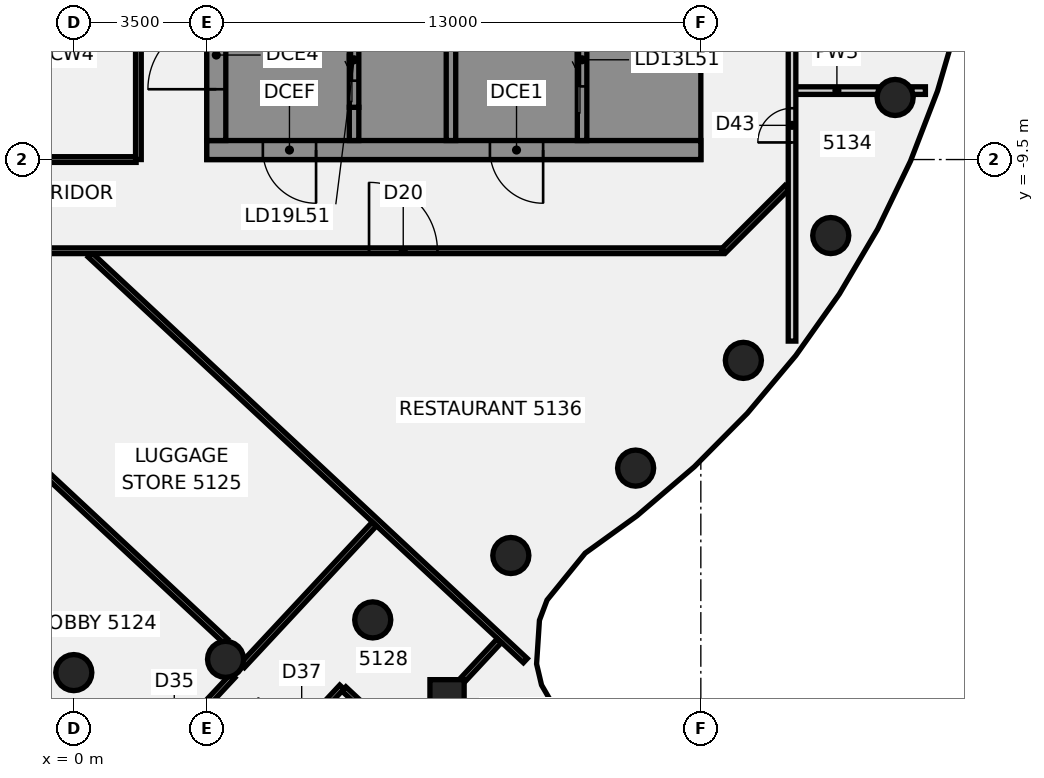
"""IFC4 building model, lengths in metres.
Left out: names, types, materials, properties, quantities, classifications, styles, units other than length and angle.
Written with IfcOpenShell. Run it as: python <this file> out.ifc"""

import sys

from ifc_helpers import new_model, si_unit, direction, frame, frame_2d, origin, origin_2d, place, context, subcontext, project, spatial, polyline, rectangle, circle, outline, extrude, element, fill, save


model = new_model("IFC4")
c1 = context("Model", 3, precision=1e-05, world=origin(), true_north=direction((0.0, 1.0)))
c2 = subcontext(c1, "Body", "Model", "MODEL_VIEW")
j1 = project(units=[si_unit("LENGTHUNIT", "METRE"), si_unit("PLANEANGLEUNIT", "RADIAN")], contexts=[c1])
p1 = place(None, origin())
s1 = spatial("IfcSite", under=j1, at=p1, CompositionType="ELEMENT")
p2 = place(p1, origin())
s2 = spatial("IfcBuilding", under=s1, at=p2, CompositionType="ELEMENT")
p3 = place(p2, frame((0.0, 0.0, 204.1)))
s3 = spatial("IfcBuildingStorey", under=s2, at=p3, CompositionType="ELEMENT", Elevation=204.1)
for number, where, z_axis, x_axis in (
    (1, (0.0, -23.0, -0.14), (0.0, 0.0, 1.0), (1.0, 0.0, 0.0)),
    (2, (3.994, -22.651, -0.14), (0.0, 0.0, 1.0), (1.0, 0.0, 0.0)),
    (3, (7.866, -21.613, -0.14), (0.0, 0.0, 1.0), (1.0, 0.0, 0.0)),
    (4, (11.5, -19.919, -0.14), (0.0, 0.0, 1.0), (1.0, 0.0, 0.0)),
    (5, (14.784, -17.619, -0.14), (0.0, 0.0, 1.0), (1.0, 0.0, 0.0)),
    (6, (17.619, -14.784, -0.14), (0.0, 0.0, 1.0), (1.0, 0.0, 0.0)),
    (7, (19.919, -11.5, -0.14), (0.0, 0.0, 1.0), (1.0, 0.0, 0.0)),
    (8, (21.613, -7.866, -0.14), (0.0, 0.0, 1.0), (1.0, 0.0, 0.0)),
):
    element("IfcColumn", number, at=place(p3, frame(where, z_axis=z_axis, x_axis=x_axis)), inside=s3, PredefinedType="COLUMN", context=c2, shape_type="SweptSolid", body=[
        extrude(circle(Radius=0.475, at=origin_2d()), origin(), (0.0, 0.0, 1.0), 3.6),
    ])
p4 = place(p3, frame((9.822, -23.635, -0.139), z_axis=(0.00779464519, 0.049750170171, 0.998731277208), x_axis=(-0.681290927814, -0.730822792245, 0.041721912875)))
e9 = element("IfcColumn", 9, at=p4, inside=s3, PredefinedType="COLUMN", context=c2, shape_type="SweptSolid", body=[
    extrude(rectangle(XDim=0.9, YDim=0.9, at=origin_2d()), origin(), (0.0, 0.0, 1.0), 3.602),
])
p5 = place(p3, frame((-11.956, -14.412, 0.0), z_axis=(0.0, 0.0, 1.0), x_axis=(0.731533748832, -0.681805231954, 0.0)))
e10 = element("IfcWall", 10, at=p5, inside=s3, PredefinedType="PARTITIONING", context=c2, shape_type="SweptSolid", body=[
    extrude(rectangle(XDim=17.64, YDim=0.15, at=frame_2d((8.82, 0.0))), origin(), (0.0, 0.0, 1.0), 2.864),
])
p6 = place(p5, frame((8.92, 0.0, 0.0)))
e11 = element("IfcOpeningElement", 11, at=p6, cuts=e10, PredefinedType="OPENING", context=c2, shape_type="SweptSolid", body=[
    extrude(rectangle(XDim=1.8, YDim=2.1, at=frame_2d((0.9, 1.05))), frame((0.0, 0.085, 0.0), z_axis=(0.0, -1.0, 0.0), x_axis=(1.0, 0.0, 0.0)), (0.0, 0.0, 1.0), 0.17),
])
p7 = place(p3, frame((-6.903, -12.012, 0.0), z_axis=(0.0, 0.0, 1.0), x_axis=(0.731569122532, -0.681767276245, 0.0)))
e12 = element("IfcWall", 12, at=p7, inside=s3, PredefinedType="PARTITIONING", context=c2, shape_type="SweptSolid", body=[
    extrude(rectangle(XDim=14.893, YDim=0.15, at=frame_2d((7.447, 0.0))), origin(), (0.0, 0.0, 1.0), 2.864),
])
p8 = place(p7, frame((4.785, 0.0, 0.0)))
e13 = element("IfcOpeningElement", 13, at=p8, cuts=e12, PredefinedType="OPENING", context=c2, shape_type="SweptSolid", body=[
    extrude(rectangle(XDim=0.9, YDim=2.1, at=frame_2d((0.45, 1.05))), frame((0.0, 0.085, 0.0), z_axis=(0.0, -1.0, 0.0), x_axis=(1.0, 0.0, 0.0)), (0.0, 0.0, 1.0), 0.17),
])
p9 = place(p3, frame((0.431, -12.012, 0.0), z_axis=(0.0, 0.0, 1.0), x_axis=(0.731576312629, -0.681759560843, 0.0)))
e14 = element("IfcWall", 14, at=p9, inside=s3, PredefinedType="PARTITIONING", context=c2, shape_type="SweptSolid", body=[
    extrude(rectangle(XDim=15.653, YDim=0.15, at=frame_2d((7.827, 0.0))), origin(), (0.0, 0.0, 1.0), 2.864),
])
p10 = place(p3, frame((7.108, -23.43, 0.0), z_axis=(0.0, 0.0, 1.0), x_axis=(0.731647999117, -0.681682628052, 0.0)))
e15 = element("IfcWall", 15, at=p10, inside=s3, PredefinedType="PARTITIONING", context=c2, shape_type="SweptSolid", body=[
    extrude(rectangle(XDim=4.285, YDim=0.15, at=frame_2d((2.143, 0.0))), origin(), (0.0, 0.0, 1.0), 2.864),
])
p11 = place(p3, frame((-17.1, -11.9, 0.0), z_axis=(0.0, 0.0, 1.0), x_axis=(1.0, 0.0, 0.0)))
e16 = element("IfcWall", 16, at=p11, inside=s3, PredefinedType="PARTITIONING", context=c2, shape_type="SweptSolid", body=[
    extrude(rectangle(XDim=34.165, YDim=0.15, at=frame_2d((17.083, 0.0))), origin(), (0.0, 0.0, 1.0), 2.864),
])
p12 = place(p11, frame((7.826, 0.0, 0.0)))
e17 = element("IfcOpeningElement", 17, at=p12, cuts=e16, PredefinedType="OPENING", context=c2, shape_type="SweptSolid", body=[
    extrude(rectangle(XDim=1.8, YDim=2.1, at=frame_2d((0.9, 1.05))), frame((0.0, 0.085, 0.0), z_axis=(0.0, -1.0, 0.0), x_axis=(1.0, 0.0, 0.0)), (0.0, 0.0, 1.0), 0.17),
])
p13 = place(p11, frame((2.1, 0.0, 0.0)))
e18 = element("IfcOpeningElement", 18, at=p13, cuts=e16, PredefinedType="OPENING", context=c2, shape_type="SweptSolid", body=[
    extrude(rectangle(XDim=1.8, YDim=2.1, at=frame_2d((0.9, 1.05))), frame((0.0, 0.085, 0.0), z_axis=(0.0, -1.0, 0.0), x_axis=(1.0, 0.0, 0.0)), (0.0, 0.0, 1.0), 0.17),
])
p14 = place(p11, frame((24.869, 0.0, 0.0)))
e19 = element("IfcOpeningElement", 19, at=p14, cuts=e16, PredefinedType="OPENING", context=c2, shape_type="SweptSolid", body=[
    extrude(rectangle(XDim=1.8, YDim=2.1, at=frame_2d((0.9, 1.05))), frame((0.0, 0.085, 0.0), z_axis=(0.0, -1.0, 0.0), x_axis=(1.0, 0.0, 0.0)), (0.0, 0.0, 1.0), 0.17),
])
p15 = place(p3, frame((-1.64, -9.5, 0.0), z_axis=(0.0, 0.0, 1.0), x_axis=(1.0, 0.0, 0.0)))
e20 = element("IfcWall", 20, at=p15, inside=s3, PredefinedType="PARTITIONING", context=c2, shape_type="SweptSolid", body=[
    extrude(rectangle(XDim=3.28, YDim=0.15, at=frame_2d((1.64, 0.0))), origin(), (0.0, 0.0, 1.0), 2.864),
])
p16 = place(p3, frame((18.985, -7.686, 0.0), z_axis=(0.0, 0.0, 1.0), x_axis=(1.0, 0.0, 0.0)))
e21 = element("IfcWall", 21, at=p16, inside=s3, PredefinedType="PARTITIONING", context=c2, shape_type="SweptSolid", body=[
    extrude(rectangle(XDim=2.191, YDim=0.2, at=frame_2d((1.096, 0.0))), origin(), (0.0, 0.0, 1.0), 2.864),
])
p17 = place(p3, frame((22.05, -7.686, 0.0), z_axis=(0.0, 0.0, 1.0), x_axis=(1.0, 0.0, 0.0)))
e22 = element("IfcWall", 22, at=p17, inside=s3, PredefinedType="PARTITIONING", context=c2, shape_type="SweptSolid", body=[
    extrude(rectangle(XDim=0.36, YDim=0.2, at=frame_2d((0.18, 0.0))), origin(), (0.0, 0.0, 1.0), 2.864),
])
p18 = place(p3, frame((17.1, -11.9, 0.0), z_axis=(0.0, 0.0, 1.0), x_axis=(0.707106781187, 0.707106781187, 0.0)))
e23 = element("IfcWall", 23, at=p18, inside=s3, PredefinedType="PARTITIONING", context=c2, shape_type="SweptSolid", body=[
    extrude(rectangle(XDim=2.355, YDim=0.15, at=frame_2d((1.178, 0.0))), origin(), (0.0, 0.0, 1.0), 2.864),
])
p19 = place(p3, frame((-1.788, -29.491, 0.0), z_axis=(0.0, 0.0, 1.0), x_axis=(0.681864267576, 0.731478721907, 0.0)))
e24 = element("IfcWall", 24, at=p19, inside=s3, PredefinedType="PARTITIONING", context=c2, shape_type="SweptSolid", body=[
    extrude(rectangle(XDim=8.759, YDim=0.15, at=frame_2d((4.379, 0.0))), origin(), (0.0, 0.0, 1.0), 2.864),
])
p20 = place(p19, frame((5.799, 0.0, 0.0)))
e25 = element("IfcOpeningElement", 25, at=p20, cuts=e24, PredefinedType="OPENING", context=c2, shape_type="SweptSolid", body=[
    extrude(rectangle(XDim=1.4, YDim=2.1, at=frame_2d((0.7, 1.05))), frame((0.0, 0.085, 0.0), z_axis=(0.0, -1.0, 0.0), x_axis=(1.0, 0.0, 0.0)), (0.0, 0.0, 1.0), 0.17),
])
p21 = place(p3, frame((4.434, -22.817, 0.0), z_axis=(0.0, 0.0, 1.0), x_axis=(0.681872489445, 0.731471057621, 0.0)))
e26 = element("IfcWall", 26, at=p21, inside=s3, PredefinedType="PARTITIONING", context=c2, shape_type="SweptSolid", body=[
    extrude(rectangle(XDim=5.095, YDim=0.15, at=frame_2d((2.547, 0.0))), origin(), (0.0, 0.0, 1.0), 2.864),
])
p22 = place(p3, frame((5.335, -25.222, 0.0), z_axis=(0.0, 0.0, 1.0), x_axis=(0.68166548211, 0.731663973761, 0.0)))
e27 = element("IfcWall", 27, at=p22, inside=s3, PredefinedType="PARTITIONING", context=c2, shape_type="SweptSolid", body=[
    extrude(rectangle(XDim=2.52, YDim=0.15, at=frame_2d((1.26, 0.0))), origin(), (0.0, 0.0, 1.0), 2.864),
])
p23 = place(p22, frame((0.52, 0.0, 0.0)))
e28 = element("IfcOpeningElement", 28, at=p23, cuts=e27, PredefinedType="OPENING", context=c2, shape_type="SweptSolid", body=[
    extrude(rectangle(XDim=0.9, YDim=2.1, at=frame_2d((0.45, 1.05))), frame((0.0, 0.085, 0.0), z_axis=(0.0, -1.0, 0.0), x_axis=(1.0, 0.0, 0.0)), (0.0, 0.0, 1.0), 0.17),
])
p24 = place(p3, frame((10.235, -23.193, 0.0), z_axis=(0.0, 0.0, 1.0), x_axis=(0.681820060396, 0.731519928124, 0.0)))
e29 = element("IfcWall", 29, at=p24, inside=s3, PredefinedType="PARTITIONING", context=c2, shape_type="SweptSolid", body=[
    extrude(rectangle(XDim=1.415, YDim=0.15, at=frame_2d((0.708, 0.0))), origin(), (0.0, 0.0, 1.0), 2.864),
])
p25 = place(p3, frame((1.7, -9.5, 0.0), z_axis=(0.0, 0.0, 1.0), x_axis=(0.0, 1.0, 0.0)))
e30 = element("IfcWall", 30, at=p25, inside=s3, PredefinedType="PARTITIONING", context=c2, shape_type="SweptSolid", body=[
    extrude(rectangle(XDim=19.0, YDim=0.15, at=frame_2d((9.5, 0.0))), origin(), (0.0, 0.0, 1.0), 2.864),
])
p26 = place(p3, frame((18.9, -14.277, 0.0), z_axis=(0.0, 0.0, 1.0), x_axis=(0.0, 1.0, 0.0)))
e31 = element("IfcWall", 31, at=p26, inside=s3, PredefinedType="PARTITIONING", context=c2, shape_type="SweptSolid", body=[
    extrude(rectangle(XDim=25.605, YDim=0.2, at=frame_2d((12.802, 0.0))), origin(), (0.0, 0.0, 1.0), 2.864),
])
p27 = place(p26, frame((5.227, 0.0, 0.0)))
e32 = element("IfcOpeningElement", 32, at=p27, cuts=e31, PredefinedType="OPENING", context=c2, shape_type="SweptSolid", body=[
    extrude(rectangle(XDim=0.9, YDim=2.1, at=frame_2d((0.45, 1.05))), frame((0.0, 0.11, 0.0), z_axis=(0.0, -1.0, 0.0), x_axis=(1.0, 0.0, 0.0)), (0.0, 0.0, 1.0), 0.22),
])
p28 = place(p26, frame((22.905, 0.0, 0.0)))
e33 = element("IfcOpeningElement", 33, at=p28, cuts=e31, PredefinedType="OPENING", context=c2, shape_type="SweptSolid", body=[
    extrude(rectangle(XDim=0.9, YDim=2.1, at=frame_2d((0.45, 1.05))), frame((0.0, 0.11, 0.0), z_axis=(0.0, -1.0, 0.0), x_axis=(1.0, 0.0, 0.0)), (0.0, 0.0, 1.0), 0.22),
])
p29 = place(p3, frame((16.5, -9.25, 0.0), z_axis=(0.0, 0.0, 1.0), x_axis=(-1.0, 0.0, 0.0)))
e34 = element("IfcWall", 34, at=p29, inside=s3, PredefinedType="SHEAR", context=c2, shape_type="SweptSolid", body=[
    extrude(rectangle(XDim=13.0, YDim=0.5, at=frame_2d((6.5, 0.0))), origin(), (0.0, 0.0, 1.0), 3.46),
])
p30 = place(p29, frame((4.15, 0.0, 0.0)))
e35 = element("IfcOpeningElement", 35, at=p30, cuts=e34, PredefinedType="OPENING", context=c2, shape_type="SweptSolid", body=[
    extrude(rectangle(XDim=1.4, YDim=2.1, at=frame_2d((0.7, 1.05))), frame((0.0, 0.26, 0.0), z_axis=(0.0, -1.0, 0.0), x_axis=(1.0, 0.0, 0.0)), (0.0, 0.0, 1.0), 0.52),
])
p31 = place(p29, frame((10.125, 0.0, 0.0)))
e36 = element("IfcOpeningElement", 36, at=p31, cuts=e34, PredefinedType="OPENING", context=c2, shape_type="SweptSolid", body=[
    extrude(rectangle(XDim=1.4, YDim=2.1, at=frame_2d((0.7, 1.05))), frame((0.0, 0.26, 0.0), z_axis=(0.0, -1.0, 0.0), x_axis=(1.0, 0.0, 0.0)), (0.0, 0.0, 1.0), 0.52),
])
p32 = place(p3, origin())
e37 = element("IfcWall", 37, at=p32, inside=s3, PredefinedType="SHEAR", context=c2, shape_type="SweptSolid", body=[
    extrude(outline(polyline([(13.5, -8.125), (13.5, -9.0), (16.0, -9.0), (16.5, -9.0), (16.5, 9.0), (16.0, 9.0), (13.5, 9.0), (13.5, 8.125), (16.0, 8.125), (16.0, 5.625), (13.5, 5.625), (13.5, 5.375), (16.0, 5.375), (16.0, -5.375), (13.5, -5.375), (13.5, -5.625), (16.0, -5.625), (16.0, -8.125), (13.5, -8.125)])), origin(), (0.0, 0.0, 1.0), 3.46),
])
p33 = place(p3, origin())
e38 = element("IfcWall", 38, at=p33, inside=s3, PredefinedType="SHEAR", context=c2, shape_type="SweptSolid", body=[
    extrude(outline(polyline([(7.5, -8.125), (7.5, -9.0), (9.8, -9.0), (9.8, -8.125), (9.8, -5.625), (9.55, -5.625), (9.55, -8.125), (7.5, -8.125)])), origin(), (0.0, 0.0, 1.0), 3.46),
])
p34 = place(p3, frame((7.375, -9.0, 0.0), z_axis=(0.0, 0.0, 1.0), x_axis=(0.0, 1.0, 0.0)))
e39 = element("IfcWall", 39, at=p34, inside=s3, PredefinedType="SHEAR", context=c2, shape_type="SweptSolid", body=[
    extrude(rectangle(XDim=0.875, YDim=0.25, at=frame_2d((0.438, 0.0))), origin(), (0.0, 0.0, 1.0), 3.46),
])
p35 = place(p3, frame((13.375, -9.0, 0.0), z_axis=(0.0, 0.0, 1.0), x_axis=(0.0, 1.0, 0.0)))
e40 = element("IfcWall", 40, at=p35, inside=s3, PredefinedType="SHEAR", context=c2, shape_type="SweptSolid", body=[
    extrude(rectangle(XDim=18.0, YDim=0.25, at=frame_2d((9.0, 0.0))), origin(), (0.0, 0.0, 1.0), 3.46),
])
p36 = place(p35, frame((1.425, 0.0, 0.0)))
e41 = element("IfcOpeningElement", 41, at=p36, cuts=e40, PredefinedType="OPENING", context=c2, shape_type="SweptSolid", body=[
    extrude(rectangle(XDim=1.4, YDim=2.1, at=frame_2d((0.7, 1.05))), frame((0.0, 0.135, 0.0), z_axis=(0.0, -1.0, 0.0), x_axis=(1.0, 0.0, 0.0)), (0.0, 0.0, 1.0), 0.27),
])
p37 = place(p35, frame((6.646, 0.0, 0.0)))
e42 = element("IfcOpeningElement", 42, at=p37, cuts=e40, PredefinedType="OPENING", context=c2, shape_type="SweptSolid", body=[
    extrude(rectangle(XDim=1.0, YDim=2.1, at=frame_2d((0.5, 1.05))), frame((0.0, 0.135, 0.0), z_axis=(0.0, -1.0, 0.0), x_axis=(1.0, 0.0, 0.0)), (0.0, 0.0, 1.0), 0.27),
])
p38 = place(p35, frame((12.146, 0.0, 0.0)))
e43 = element("IfcOpeningElement", 43, at=p38, cuts=e40, PredefinedType="OPENING", context=c2, shape_type="SweptSolid", body=[
    extrude(rectangle(XDim=1.0, YDim=2.1, at=frame_2d((0.5, 1.05))), frame((0.0, 0.135, 0.0), z_axis=(0.0, -1.0, 0.0), x_axis=(1.0, 0.0, 0.0)), (0.0, 0.0, 1.0), 0.27),
])
p39 = place(p3, frame((9.925, -9.0, 0.0), z_axis=(0.0, 0.0, 1.0), x_axis=(0.0, 1.0, 0.0)))
e44 = element("IfcWall", 44, at=p39, inside=s3, PredefinedType="SHEAR", context=c2, shape_type="SweptSolid", body=[
    extrude(rectangle(XDim=18.0, YDim=0.25, at=frame_2d((9.0, 0.0))), origin(), (0.0, 0.0, 1.0), 3.46),
])
p40 = place(p39, frame((4.275, 0.0, 0.0)))
e45 = element("IfcOpeningElement", 45, at=p40, cuts=e44, PredefinedType="OPENING", context=c2, shape_type="SweptSolid", body=[
    extrude(rectangle(XDim=1.2, YDim=2.1, at=frame_2d((0.6, 1.05))), frame((0.0, 0.135, 0.0), z_axis=(0.0, -1.0, 0.0), x_axis=(1.0, 0.0, 0.0)), (0.0, 0.0, 1.0), 0.27),
])
p41 = place(p39, frame((7.025, 0.0, 0.0)))
e46 = element("IfcOpeningElement", 46, at=p41, cuts=e44, PredefinedType="OPENING", context=c2, shape_type="SweptSolid", body=[
    extrude(rectangle(XDim=1.2, YDim=2.1, at=frame_2d((0.6, 1.05))), frame((0.0, 0.135, 0.0), z_axis=(0.0, -1.0, 0.0), x_axis=(1.0, 0.0, 0.0)), (0.0, 0.0, 1.0), 0.27),
])
p42 = place(p39, frame((9.825, 0.0, 0.0)))
e47 = element("IfcOpeningElement", 47, at=p42, cuts=e44, PredefinedType="OPENING", context=c2, shape_type="SweptSolid", body=[
    extrude(rectangle(XDim=1.1, YDim=2.1, at=frame_2d((0.55, 1.05))), frame((0.0, 0.135, 0.0), z_axis=(0.0, -1.0, 0.0), x_axis=(1.0, 0.0, 0.0)), (0.0, 0.0, 1.0), 0.27),
])
p43 = place(p3, frame((7.375, -8.125, 0.0), z_axis=(0.0, 0.0, 1.0), x_axis=(0.0, 1.0, 0.0)))
e48 = element("IfcWall", 48, at=p43, inside=s3, PredefinedType="SHEAR", context=c2, shape_type="SweptSolid", body=[
    extrude(rectangle(XDim=2.5, YDim=0.25, at=frame_2d((1.25, 0.0))), origin(), (0.0, 0.0, 1.0), 3.46),
])
p44 = place(p43, frame((0.7, 0.0, 0.0)))
e49 = element("IfcOpeningElement", 49, at=p44, cuts=e48, PredefinedType="OPENING", context=c2, shape_type="SweptSolid", body=[
    extrude(rectangle(XDim=1.1, YDim=2.1, at=frame_2d((0.55, 1.05))), frame((0.0, 0.135, 0.0), z_axis=(0.0, -1.0, 0.0), x_axis=(1.0, 0.0, 0.0)), (0.0, 0.0, 1.0), 0.27),
])
p45 = place(p3, frame((3.75, -9.0, 0.0), z_axis=(0.0, 0.0, 1.0), x_axis=(0.0, 1.0, 0.0)))
e50 = element("IfcWall", 50, at=p45, inside=s3, PredefinedType="SHEAR", context=c2, shape_type="SweptSolid", body=[
    extrude(rectangle(XDim=18.0, YDim=0.5, at=frame_2d((9.0, 0.0))), origin(), (0.0, 0.0, 1.0), 3.46),
])
p46 = place(p45, frame((1.35, 0.0, 0.0)))
e51 = element("IfcOpeningElement", 51, at=p46, cuts=e50, PredefinedType="OPENING", context=c2, shape_type="SweptSolid", body=[
    extrude(rectangle(XDim=1.8, YDim=2.1, at=frame_2d((0.9, 1.05))), frame((0.0, 0.26, 0.0), z_axis=(0.0, -1.0, 0.0), x_axis=(1.0, 0.0, 0.0)), (0.0, 0.0, 1.0), 0.52),
])
p47 = place(p45, frame((12.75, 0.0, 0.0)))
e52 = element("IfcOpeningElement", 52, at=p47, cuts=e50, PredefinedType="OPENING", context=c2, shape_type="SweptSolid", body=[
    extrude(rectangle(XDim=1.0, YDim=2.1, at=frame_2d((0.5, 1.05))), frame((0.0, 0.26, 0.0), z_axis=(0.0, -1.0, 0.0), x_axis=(1.0, 0.0, 0.0)), (0.0, 0.0, 1.0), 0.52),
])
p48 = place(p45, frame((16.274, 0.0, 0.0)))
e53 = element("IfcOpeningElement", 53, at=p48, cuts=e50, PredefinedType="OPENING", context=c2, shape_type="SweptSolid", body=[
    extrude(rectangle(XDim=1.0, YDim=2.1, at=frame_2d((0.5, 1.05))), frame((0.0, 0.26, 0.0), z_axis=(0.0, -1.0, 0.0), x_axis=(1.0, 0.0, 0.0)), (0.0, 0.0, 1.0), 0.52),
])
p49 = place(p14, origin())
e54 = element("IfcDoor", 54, at=p49, inside=s3, OperationType="DOUBLE_DOOR_SINGLE_SWING", PredefinedType="DOOR", context=c2, shape_type="SweptSolid", body=[
    extrude(rectangle(XDim=1.8, YDim=2.1, at=frame_2d((0.9, 1.05))), frame((0.0, 0.025, 0.0), z_axis=(0.0, -1.0, 0.0), x_axis=(1.0, 0.0, 0.0)), (0.0, 0.0, 1.0), 0.05),
])
fill(e19, e54)
p50 = place(p27, frame((0.9, 0.0, 0.0), z_axis=(0.0, 0.0, 1.0), x_axis=(-1.0, 0.0, 0.0)))
e55 = element("IfcDoor", 55, at=p50, inside=s3, OperationType="SINGLE_SWING_LEFT", PredefinedType="DOOR", context=c2, shape_type="SweptSolid", body=[
    extrude(rectangle(XDim=0.9, YDim=2.1, at=frame_2d((0.45, 1.05))), frame((0.0, 0.025, 0.0), z_axis=(0.0, -1.0, 0.0), x_axis=(1.0, 0.0, 0.0)), (0.0, 0.0, 1.0), 0.05),
])
fill(e32, e55)
p51 = place(p30, origin())
e56 = element("IfcDoor", 56, at=p51, inside=s3, OperationType="SINGLE_SWING_LEFT", PredefinedType="DOOR", context=c2, shape_type="SweptSolid", body=[
    extrude(rectangle(XDim=1.4, YDim=2.1, at=frame_2d((0.7, 1.05))), frame((0.0, 0.025, 0.0), z_axis=(0.0, -1.0, 0.0), x_axis=(1.0, 0.0, 0.0)), (0.0, 0.0, 1.0), 0.05),
])
fill(e35, e56)
p52 = place(p31, origin())
e57 = element("IfcDoor", 57, at=p52, inside=s3, OperationType="SINGLE_SWING_LEFT", PredefinedType="DOOR", context=c2, shape_type="SweptSolid", body=[
    extrude(rectangle(XDim=1.4, YDim=2.1, at=frame_2d((0.7, 1.05))), frame((0.0, 0.025, 0.0), z_axis=(0.0, -1.0, 0.0), x_axis=(1.0, 0.0, 0.0)), (0.0, 0.0, 1.0), 0.05),
])
fill(e36, e57)
p53 = place(p46, origin())
e58 = element("IfcDoor", 58, at=p53, inside=s3, OperationType="SINGLE_SWING_LEFT", PredefinedType="DOOR", context=c2, shape_type="SweptSolid", body=[
    extrude(rectangle(XDim=1.8, YDim=2.1, at=frame_2d((0.9, 1.05))), frame((0.0, 0.025, 0.0), z_axis=(0.0, -1.0, 0.0), x_axis=(1.0, 0.0, 0.0)), (0.0, 0.0, 1.0), 0.05),
])
fill(e51, e58)
p54 = place(p36, origin())
e59 = element("IfcDoor", 59, at=p54, inside=s3, OperationType="SLIDING_TO_LEFT", PredefinedType="DOOR", context=c2, shape_type="SweptSolid", body=[
    extrude(rectangle(XDim=1.4, YDim=2.1, at=frame_2d((0.7, 1.05))), frame((0.0, 0.025, 0.0), z_axis=(0.0, -1.0, 0.0), x_axis=(1.0, 0.0, 0.0)), (0.0, 0.0, 1.0), 0.05),
])
fill(e41, e59)
p55 = place(p44, origin())
e60 = element("IfcDoor", 60, at=p55, inside=s3, OperationType="SLIDING_TO_LEFT", PredefinedType="DOOR", context=c2, shape_type="SweptSolid", body=[
    extrude(rectangle(XDim=1.1, YDim=2.1, at=frame_2d((0.55, 1.05))), frame((0.0, 0.025, 0.0), z_axis=(0.0, -1.0, 0.0), x_axis=(1.0, 0.0, 0.0)), (0.0, 0.0, 1.0), 0.05),
])
fill(e49, e60)
save(model, sys.argv[1])
